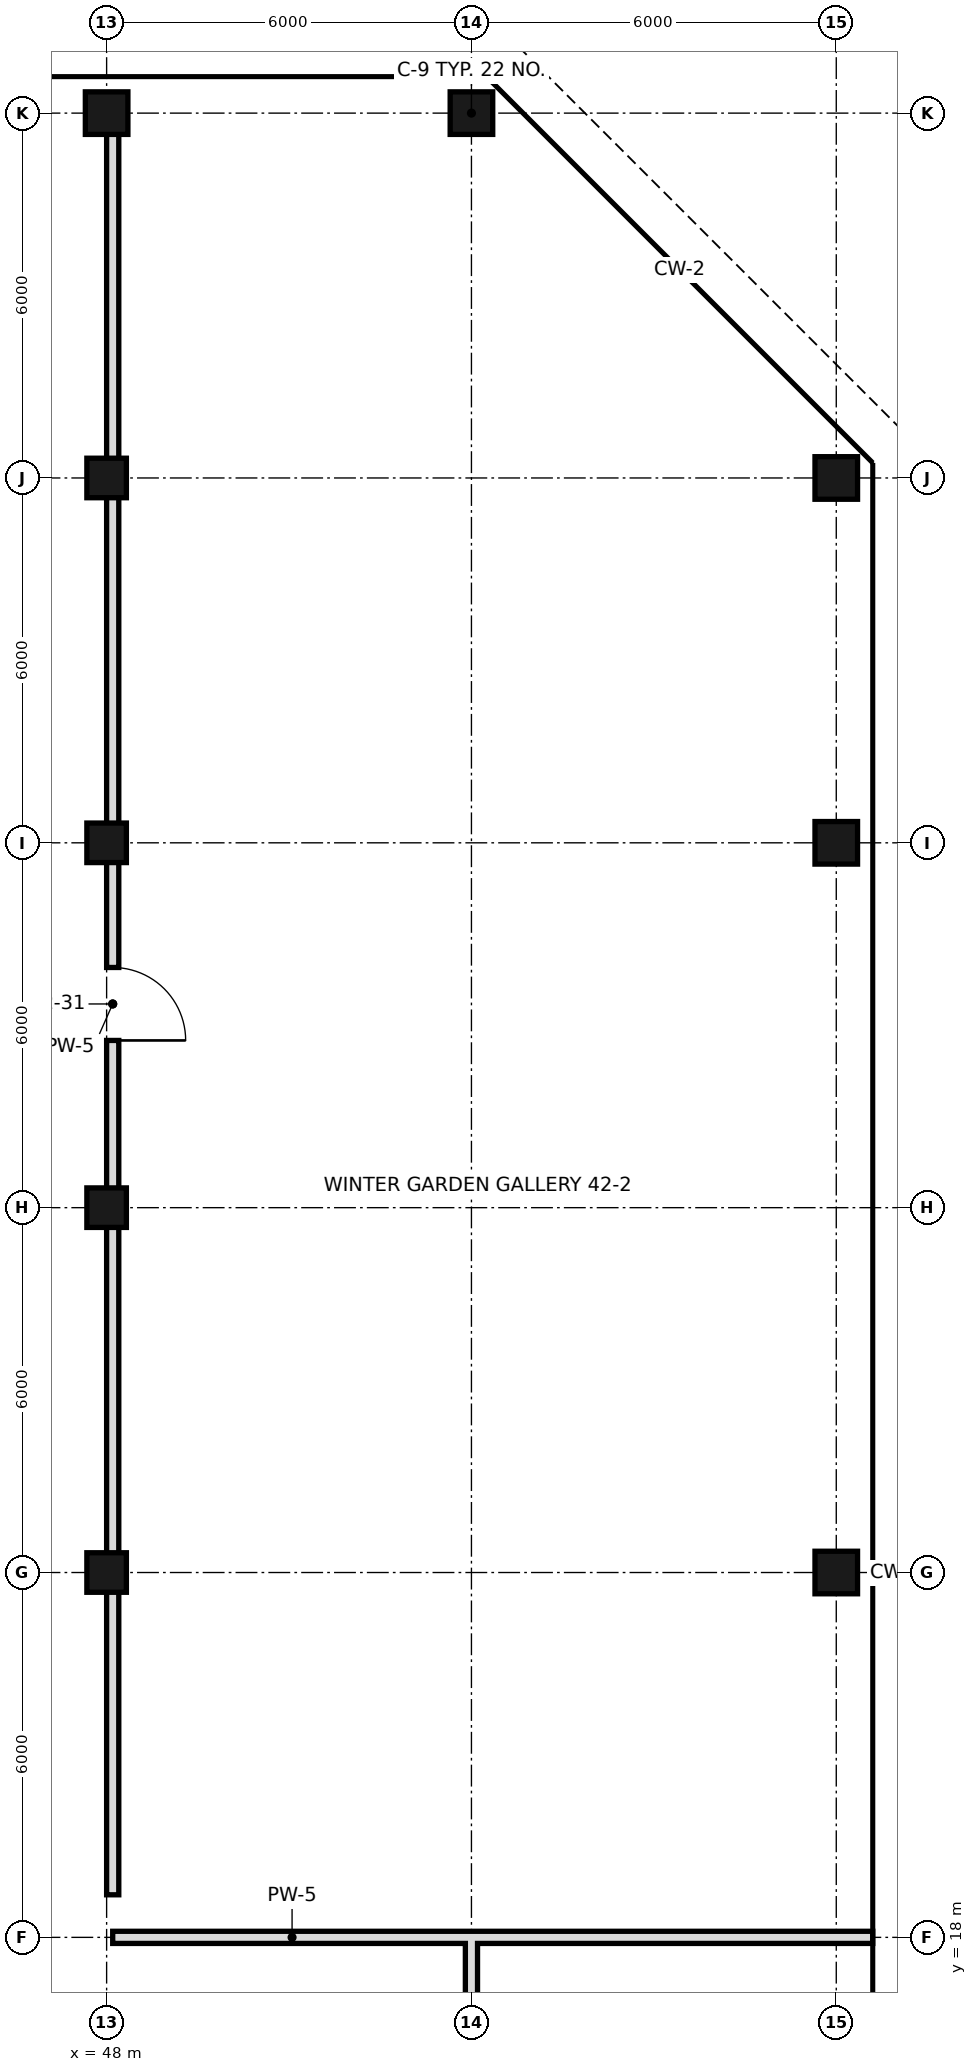
"""IFC4 building model, lengths in metres.
Left out: names, types, materials, properties, quantities, classifications, styles, units other than length and angle.
Written with IfcOpenShell. Run it as: python <this file> out.ifc"""

import sys

from ifc_helpers import new_model, si_unit, direction, frame, frame_2d, origin, origin_2d, place, context, subcontext, project, spatial, rectangle, hollow_rectangle, extrude, element, fill, save


model = new_model("IFC4")
c1 = context("Model", 3, precision=1e-05, world=origin(), true_north=direction((0.0, 1.0)))
c2 = subcontext(c1, "Body", "Model", "MODEL_VIEW")
j1 = project(units=[si_unit("LENGTHUNIT", "METRE"), si_unit("PLANEANGLEUNIT", "RADIAN")], contexts=[c1])
p1 = place(None, origin())
s1 = spatial("IfcSite", under=j1, at=p1, CompositionType="ELEMENT")
p2 = place(p1, origin())
s2 = spatial("IfcBuilding", under=s1, at=p2, CompositionType="ELEMENT")
p3 = place(p2, frame((0.0, 0.0, 181.6)))
s3 = spatial("IfcBuildingStorey", under=s2, at=p3, CompositionType="ELEMENT", Elevation=181.6)
for number, where, z_axis, x_axis in (
    (1, (48.0, 24.0, 0.0), (0.0, 0.0, 1.0), (1.0, 0.0, 0.0)),
    (2, (48.0, 30.0, 0.0), (0.0, 0.0, 1.0), (1.0, 0.0, 0.0)),
    (3, (48.0, 36.0, 0.0), (0.0, 0.0, 1.0), (1.0, 0.0, 0.0)),
    (4, (48.0, 42.0, 0.0), (0.0, 0.0, 1.0), (1.0, 0.0, 0.0)),
):
    element("IfcColumn", number, at=place(p3, frame(where, z_axis=z_axis, x_axis=x_axis)), inside=s3, PredefinedType="COLUMN", context=c2, shape_type="SweptSolid", body=[
        extrude(hollow_rectangle(XDim=0.65, YDim=0.65, WallThickness=0.032, at=origin_2d()), origin(), (0.0, 0.0, 1.0), 4.4),
    ])
for number, where, z_axis, x_axis in (
    (5, (48.0, 48.0, 0.0), (0.0, 0.0, 1.0), (1.0, 0.0, 0.0)),
    (6, (54.0, 48.0, 0.0), (0.0, 0.0, 1.0), (1.0, 0.0, 0.0)),
    (7, (60.0, 24.0, 0.0), (0.0, 0.0, 1.0), (1.0, 0.0, 0.0)),
    (8, (60.0, 36.0, 0.0), (0.0, 0.0, 1.0), (1.0, 0.0, 0.0)),
    (9, (60.0, 42.0, 0.0), (0.0, 0.0, 1.0), (1.0, 0.0, 0.0)),
):
    element("IfcColumn", number, at=place(p3, frame(where, z_axis=z_axis, x_axis=x_axis)), inside=s3, PredefinedType="COLUMN", context=c2, shape_type="SweptSolid", body=[
        extrude(hollow_rectangle(XDim=0.7, YDim=0.7, WallThickness=0.036, at=origin_2d()), origin(), (0.0, 0.0, 1.0), 4.4),
    ])
p4 = place(p3, frame((48.1, 18.7, 0.0), z_axis=(0.0, 0.0, 1.0), x_axis=(0.0, 1.0, 0.0)))
e10 = element("IfcWall", 10, at=p4, inside=s3, PredefinedType="SOLIDWALL", context=c2, shape_type="SweptSolid", body=[
    extrude(rectangle(XDim=29.3, YDim=0.2, at=frame_2d((14.65, 0.0))), origin(), (0.0, 0.0, 1.0), 3.4),
])
p5 = place(p4, frame((14.05, 0.0, 0.0)))
e11 = element("IfcOpeningElement", 11, at=p5, cuts=e10, PredefinedType="OPENING", context=c2, shape_type="SweptSolid", body=[
    extrude(rectangle(XDim=1.2, YDim=2.4, at=frame_2d((0.6, 1.2))), frame((0.0, 0.11, 0.0), z_axis=(0.0, -1.0, 0.0), x_axis=(1.0, 0.0, 0.0)), (0.0, 0.0, 1.0), 0.22),
])
p6 = place(p3, frame((54.0, 10.8, 0.0), z_axis=(0.0, 0.0, 1.0), x_axis=(0.0, 1.0, 0.0)))
e12 = element("IfcWall", 12, at=p6, inside=s3, PredefinedType="SOLIDWALL", context=c2, shape_type="SweptSolid", body=[
    extrude(rectangle(XDim=7.2, YDim=0.2, at=frame_2d((3.6, 0.0))), origin(), (0.0, 0.0, 1.0), 3.4),
])
p7 = place(p3, frame((48.1, 18.0, 0.0), z_axis=(0.0, 0.0, 1.0), x_axis=(1.0, 0.0, 0.0)))
e13 = element("IfcWall", 13, at=p7, inside=s3, PredefinedType="SOLIDWALL", context=c2, shape_type="SweptSolid", body=[
    extrude(rectangle(XDim=5.9, YDim=0.2, at=frame_2d((2.95, 0.0))), origin(), (0.0, 0.0, 1.0), 3.4),
])
p8 = place(p3, frame((54.0, 18.0, 0.0), z_axis=(0.0, 0.0, 1.0), x_axis=(1.0, 0.0, 0.0)))
e14 = element("IfcWall", 14, at=p8, inside=s3, PredefinedType="SOLIDWALL", context=c2, shape_type="SweptSolid", body=[
    extrude(rectangle(XDim=6.6, YDim=0.2, at=frame_2d((3.3, 0.0))), origin(), (0.0, 0.0, 1.0), 3.4),
])
p9 = place(p5, frame((1.2, 0.0, 0.0), z_axis=(0.0, 0.0, 1.0), x_axis=(-1.0, 0.0, 0.0)))
e15 = element("IfcDoor", 15, at=p9, inside=s3, OperationType="SINGLE_SWING_RIGHT", PredefinedType="DOOR", context=c2, shape_type="SweptSolid", body=[
    extrude(rectangle(XDim=1.2, YDim=2.4, at=frame_2d((0.6, 1.2))), frame((0.0, 0.025, 0.0), z_axis=(0.0, -1.0, 0.0), x_axis=(1.0, 0.0, 0.0)), (0.0, 0.0, 1.0), 0.05),
])
fill(e11, e15)
save(model, sys.argv[1])
